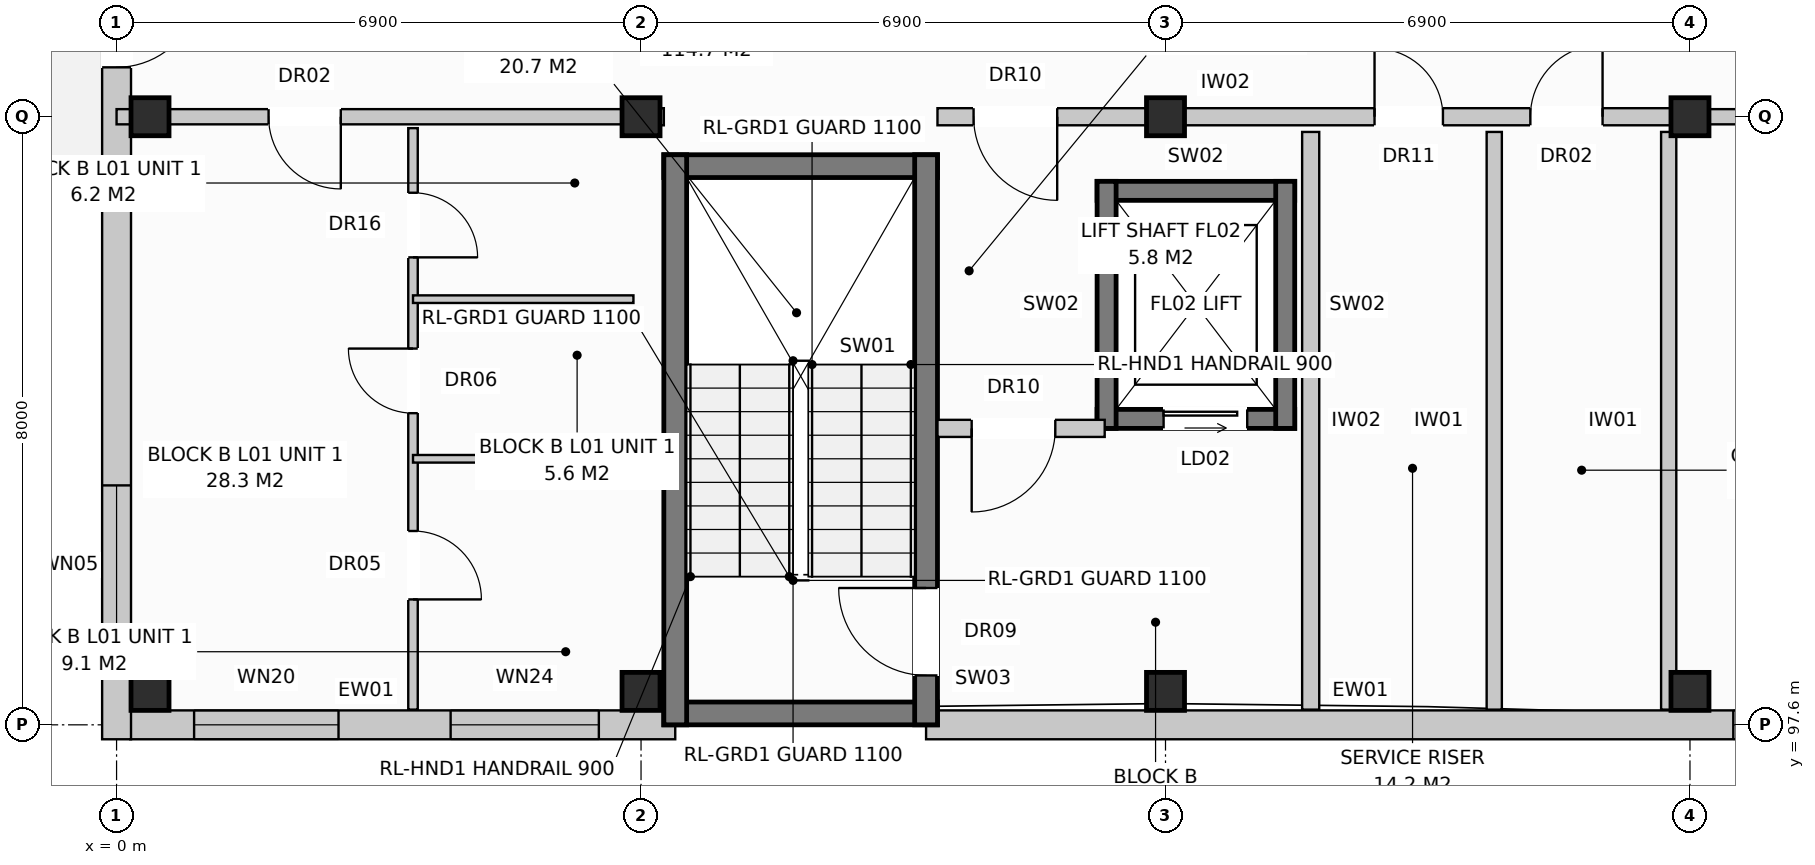
"""IFC4 building model, lengths in metres.
Left out: names, types, materials, properties, quantities, classifications, styles, units other than length and angle.
Written with IfcOpenShell. Run it as: python <this file> out.ifc"""

import sys

from ifc_helpers import new_model, si_unit, direction, frame, frame_2d, origin, origin_with_axes, origin_2d, place, context, subcontext, project, spatial, rectangle, extrude, element, fill, save


model = new_model("IFC4")
c1 = context("Model", 3, precision=1e-05, world=origin(), true_north=direction((0.0, 1.0)))
c2 = subcontext(c1, "Body", "Model", "MODEL_VIEW")
j1 = project(units=[si_unit("LENGTHUNIT", "METRE"), si_unit("PLANEANGLEUNIT", "RADIAN")], contexts=[c1])
p1 = place(None, origin())
s1 = spatial("IfcSite", under=j1, at=p1, CompositionType="ELEMENT")
p2 = place(p1, origin())
s2 = spatial("IfcBuilding", under=s1, at=p2, CompositionType="ELEMENT")
p3 = place(p2, frame((0.0, 0.0, 4.4)))
s3 = spatial("IfcBuildingStorey", under=s2, at=p3, CompositionType="ELEMENT", Elevation=4.4)
for number, where, z_axis, x_axis in (
    (1, (0.44, 98.04, 0.0), (0.0, 0.0, 1.0), (1.0, 0.0, 0.0)),
    (2, (0.44, 105.6, 0.0), (0.0, 0.0, 1.0), (1.0, 0.0, 0.0)),
    (3, (6.9, 98.04, 0.0), (0.0, 0.0, 1.0), (1.0, 0.0, 0.0)),
    (4, (6.9, 105.6, 0.0), (0.0, 0.0, 1.0), (1.0, 0.0, 0.0)),
    (5, (13.8, 98.04, 0.0), (0.0, 0.0, 1.0), (1.0, 0.0, 0.0)),
    (6, (13.8, 105.6, 0.0), (0.0, 0.0, 1.0), (1.0, 0.0, 0.0)),
    (7, (20.7, 98.04, 0.0), (0.0, 0.0, 1.0), (1.0, 0.0, 0.0)),
    (8, (20.7, 105.6, 0.0), (0.0, 0.0, 1.0), (1.0, 0.0, 0.0)),
):
    element("IfcColumn", number, at=place(p3, frame(where, z_axis=z_axis, x_axis=x_axis)), inside=s3, PredefinedType="COLUMN", context=c2, shape_type="SweptSolid", body=[
        extrude(rectangle(XDim=0.5, YDim=0.5, at=origin_2d()), origin(), (0.0, 0.0, 1.0), 3.6),
    ])
p4 = place(p3, frame((0.18, 97.6, 0.0), z_axis=(0.0, 0.0, 1.0), x_axis=(1.0, 0.0, 0.0)))
e9 = element("IfcWall", 9, at=p4, inside=s3, PredefinedType="STANDARD", context=c2, shape_type="SweptSolid", body=[
    extrude(rectangle(XDim=7.17, YDim=0.38, at=frame_2d((3.585, 0.0))), origin(), (0.0, 0.0, 1.0), 3.33),
])
p5 = place(p4, frame((0.84, 0.0, 0.8)))
e10 = element("IfcOpeningElement", 10, at=p5, cuts=e9, PredefinedType="OPENING", context=c2, shape_type="SweptSolid", body=[
    extrude(rectangle(XDim=1.9, YDim=1.85, at=frame_2d((0.95, 0.925))), frame((0.0, 0.202, 0.0), z_axis=(0.0, -1.0, 0.0), x_axis=(1.0, 0.0, 0.0)), (0.0, 0.0, 1.0), 0.404),
])
p6 = place(p4, frame((4.215, 0.0, 0.8)))
e11 = element("IfcOpeningElement", 11, at=p6, cuts=e9, PredefinedType="OPENING", context=c2, shape_type="SweptSolid", body=[
    extrude(rectangle(XDim=1.95, YDim=1.65, at=frame_2d((0.975, 0.825))), frame((0.0, 0.202, 0.0), z_axis=(0.0, -1.0, 0.0), x_axis=(1.0, 0.0, 0.0)), (0.0, 0.0, 1.0), 0.404),
])
p7 = place(p3, frame((10.65, 97.6, 0.0), z_axis=(0.0, 0.0, 1.0), x_axis=(1.0, 0.0, 0.0)))
e12 = element("IfcWall", 12, at=p7, inside=s3, PredefinedType="STANDARD", context=c2, shape_type="SweptSolid", body=[
    extrude(rectangle(XDim=17.4, YDim=0.38, at=frame_2d((8.7, 0.0))), origin(), (0.0, 0.0, 1.0), 3.33),
])
p8 = place(p7, frame((11.825, 0.0, 0.0)))
e13 = element("IfcOpeningElement", 13, at=p8, cuts=e12, PredefinedType="OPENING", context=c2, shape_type="SweptSolid", body=[
    extrude(rectangle(XDim=1.05, YDim=2.12, at=frame_2d((0.525, 1.06))), frame((0.0, 0.202, 0.0), z_axis=(0.0, -1.0, 0.0), x_axis=(1.0, 0.0, 0.0)), (0.0, 0.0, 1.0), 0.404),
])
p9 = place(p7, frame((10.62, 0.0, 0.9)))
e14 = element("IfcOpeningElement", 14, at=p9, cuts=e12, PredefinedType="OPENING", context=c2, shape_type="SweptSolid", body=[
    extrude(rectangle(XDim=0.95, YDim=1.55, at=frame_2d((0.475, 0.775))), frame((0.0, 0.202, 0.0), z_axis=(0.0, -1.0, 0.0), x_axis=(1.0, 0.0, 0.0)), (0.0, 0.0, 1.0), 0.404),
])
p10 = place(p7, frame((14.47, 0.0, 0.8)))
e15 = element("IfcOpeningElement", 15, at=p10, cuts=e12, PredefinedType="OPENING", context=c2, shape_type="SweptSolid", body=[
    extrude(rectangle(XDim=1.9, YDim=1.85, at=frame_2d((0.95, 0.925))), frame((0.0, 0.202, 0.0), z_axis=(0.0, -1.0, 0.0), x_axis=(1.0, 0.0, 0.0)), (0.0, 0.0, 1.0), 0.404),
])
p11 = place(p3, frame((0.0, 97.41, 0.0), z_axis=(0.0, 0.0, 1.0), x_axis=(0.0, 1.0, 0.0)))
e16 = element("IfcWall", 16, at=p11, inside=s3, PredefinedType="STANDARD", context=c2, shape_type="SweptSolid", body=[
    extrude(rectangle(XDim=18.78, YDim=0.38, at=frame_2d((9.39, 0.0))), origin(), (0.0, 0.0, 1.0), 3.33),
])
p12 = place(p11, frame((8.84, 0.0, 0.0)))
e17 = element("IfcOpeningElement", 17, at=p12, cuts=e16, PredefinedType="OPENING", context=c2, shape_type="SweptSolid", body=[
    extrude(rectangle(XDim=1.1, YDim=2.1, at=frame_2d((0.55, 1.05))), frame((0.0, 0.202, 0.0), z_axis=(0.0, -1.0, 0.0), x_axis=(1.0, 0.0, 0.0)), (0.0, 0.0, 1.0), 0.404),
])
p13 = place(p11, frame((1.24, 0.0, 0.72)))
e18 = element("IfcOpeningElement", 18, at=p13, cuts=e16, PredefinedType="OPENING", context=c2, shape_type="SweptSolid", body=[
    extrude(rectangle(XDim=2.1, YDim=1.9, at=frame_2d((1.05, 0.95))), frame((0.0, 0.202, 0.0), z_axis=(0.0, -1.0, 0.0), x_axis=(1.0, 0.0, 0.0)), (0.0, 0.0, 1.0), 0.404),
])
p14 = place(p11, frame((15.44, 0.0, 0.72)))
e19 = element("IfcOpeningElement", 19, at=p14, cuts=e16, PredefinedType="OPENING", context=c2, shape_type="SweptSolid", body=[
    extrude(rectangle(XDim=2.1, YDim=1.9, at=frame_2d((1.05, 0.95))), frame((0.0, 0.202, 0.0), z_axis=(0.0, -1.0, 0.0), x_axis=(1.0, 0.0, 0.0)), (0.0, 0.0, 1.0), 0.404),
])
for number, where, z_axis, x_axis in (
    (20, (7.2, 97.75, 0.0), (0.0, 0.0, 1.0), (1.0, 0.0, 0.0)),
    (21, (7.2, 104.95, 0.0), (0.0, 0.0, 1.0), (1.0, 0.0, 0.0)),
):
    element("IfcWall", number, at=place(p3, frame(where, z_axis=z_axis, x_axis=x_axis)), inside=s3, PredefinedType="SHEAR", context=c2, shape_type="SweptSolid", body=[
        extrude(rectangle(XDim=3.6, YDim=0.3, at=frame_2d((1.8, 0.0))), origin(), (0.0, 0.0, 1.0), 3.33),
    ])
p15 = place(p3, frame((7.35, 97.6, 0.0), z_axis=(0.0, 0.0, 1.0), x_axis=(0.0, 1.0, 0.0)))
e22 = element("IfcWall", 22, at=p15, inside=s3, PredefinedType="SHEAR", context=c2, shape_type="SweptSolid", body=[
    extrude(rectangle(XDim=7.5, YDim=0.3, at=frame_2d((3.75, 0.0))), origin(), (0.0, 0.0, 1.0), 3.33),
])
p16 = place(p3, frame((10.65, 97.6, 0.0), z_axis=(0.0, 0.0, 1.0), x_axis=(0.0, 1.0, 0.0)))
e23 = element("IfcWall", 23, at=p16, inside=s3, PredefinedType="SHEAR", context=c2, shape_type="SweptSolid", body=[
    extrude(rectangle(XDim=7.5, YDim=0.3, at=frame_2d((3.75, 0.0))), origin(), (0.0, 0.0, 1.0), 3.33),
])
p17 = place(p16, frame((0.65, 0.0, 0.0)))
e24 = element("IfcOpeningElement", 24, at=p17, cuts=e23, PredefinedType="OPENING", context=c2, shape_type="SweptSolid", body=[
    extrude(rectangle(XDim=1.15, YDim=2.15, at=frame_2d((0.575, 1.075))), frame((0.0, 0.162, 0.0), z_axis=(0.0, -1.0, 0.0), x_axis=(1.0, 0.0, 0.0)), (0.0, 0.0, 1.0), 0.324),
])
p18 = place(p3, frame((12.9, 101.625, 0.0), z_axis=(0.0, 0.0, 1.0), x_axis=(1.0, 0.0, 0.0)))
e25 = element("IfcWall", 25, at=p18, inside=s3, PredefinedType="SHEAR", context=c2, shape_type="SweptSolid", body=[
    extrude(rectangle(XDim=2.6, YDim=0.25, at=frame_2d((1.3, 0.0))), origin(), (0.0, 0.0, 1.0), 3.33),
])
p19 = place(p18, frame((0.875, 0.0, 0.0)))
e26 = element("IfcOpeningElement", 26, at=p19, cuts=e25, PredefinedType="OPENING", context=c2, shape_type="SweptSolid", body=[
    extrude(rectangle(XDim=1.1, YDim=2.1, at=frame_2d((0.55, 1.05))), frame((0.0, 0.137, 0.0), z_axis=(0.0, -1.0, 0.0), x_axis=(1.0, 0.0, 0.0)), (0.0, 0.0, 1.0), 0.274),
])
p20 = place(p3, frame((12.9, 104.625, 0.0), z_axis=(0.0, 0.0, 1.0), x_axis=(1.0, 0.0, 0.0)))
e27 = element("IfcWall", 27, at=p20, inside=s3, PredefinedType="SHEAR", context=c2, shape_type="SweptSolid", body=[
    extrude(rectangle(XDim=2.6, YDim=0.25, at=frame_2d((1.3, 0.0))), origin(), (0.0, 0.0, 1.0), 3.33),
])
for number, where, z_axis, x_axis in (
    (28, (13.025, 101.5, 0.0), (0.0, 0.0, 1.0), (0.0, 1.0, 0.0)),
    (29, (15.375, 101.5, 0.0), (0.0, 0.0, 1.0), (0.0, 1.0, 0.0)),
):
    element("IfcWall", number, at=place(p3, frame(where, z_axis=z_axis, x_axis=x_axis)), inside=s3, PredefinedType="SHEAR", context=c2, shape_type="SweptSolid", body=[
        extrude(rectangle(XDim=3.25, YDim=0.25, at=frame_2d((1.625, 0.0))), origin(), (0.0, 0.0, 1.0), 3.33),
    ])
p21 = place(p3, frame((15.71, 97.8, 0.0), z_axis=(0.0, 0.0, 1.0), x_axis=(0.0, 1.0, 0.0)))
e30 = element("IfcWall", 30, at=p21, inside=s3, PredefinedType="PARTITIONING", context=c2, shape_type="SweptSolid", body=[
    extrude(rectangle(XDim=7.6, YDim=0.225, at=frame_2d((3.8, 0.0))), origin(), (0.0, 0.0, 1.0), 2.99),
])
p22 = place(p3, frame((10.8, 101.5, 0.0), z_axis=(0.0, 0.0, 1.0), x_axis=(1.0, 0.0, 0.0)))
e31 = element("IfcWall", 31, at=p22, inside=s3, PredefinedType="PARTITIONING", context=c2, shape_type="SweptSolid", body=[
    extrude(rectangle(XDim=2.2, YDim=0.225, at=frame_2d((1.1, 0.0))), origin(), (0.0, 0.0, 1.0), 3.33),
])
p23 = place(p22, frame((0.45, 0.0, 0.0)))
e32 = element("IfcOpeningElement", 32, at=p23, cuts=e31, PredefinedType="OPENING", context=c2, shape_type="SweptSolid", body=[
    extrude(rectangle(XDim=1.1, YDim=2.15, at=frame_2d((0.55, 1.075))), frame((0.0, 0.125, 0.0), z_axis=(0.0, -1.0, 0.0), x_axis=(1.0, 0.0, 0.0)), (0.0, 0.0, 1.0), 0.249),
])
p24 = place(p3, frame((6.9, 105.6, 0.0), z_axis=(0.0, 0.0, 1.0), x_axis=(1.0, 0.0, 0.0)))
e33 = element("IfcWall", 33, at=p24, inside=s3, PredefinedType="PARTITIONING", context=c2, shape_type="SweptSolid", body=[
    extrude(rectangle(XDim=0.3, YDim=0.225, at=frame_2d((0.15, 0.0))), origin(), (0.0, 0.0, 1.0), 3.33),
])
for number, where, z_axis, x_axis in (
    (34, (18.125, 97.8, 0.0), (0.0, 0.0, 1.0), (0.0, 1.0, 0.0)),
    (35, (20.42, 97.8, 0.0), (0.0, 0.0, 1.0), (0.0, 1.0, 0.0)),
):
    element("IfcWall", number, at=place(p3, frame(where, z_axis=z_axis, x_axis=x_axis)), inside=s3, PredefinedType="PARTITIONING", context=c2, shape_type="SweptSolid", body=[
        extrude(rectangle(XDim=7.6, YDim=0.2, at=frame_2d((3.8, 0.0))), origin(), (0.0, 0.0, 1.0), 3.33),
    ])
p25 = place(p3, frame((10.8, 105.6, 0.0), z_axis=(0.0, 0.0, 1.0), x_axis=(1.0, 0.0, 0.0)))
e36 = element("IfcWall", 36, at=p25, inside=s3, PredefinedType="PARTITIONING", context=c2, shape_type="SweptSolid", body=[
    extrude(rectangle(XDim=9.9, YDim=0.225, at=frame_2d((4.95, 0.0))), origin(), (0.0, 0.0, 1.0), 2.77),
])
p26 = place(p25, frame((0.475, 0.0, 0.0)))
e37 = element("IfcOpeningElement", 37, at=p26, cuts=e36, PredefinedType="OPENING", context=c2, shape_type="SweptSolid", body=[
    extrude(rectangle(XDim=1.1, YDim=2.15, at=frame_2d((0.55, 1.075))), frame((0.0, 0.125, 0.0), z_axis=(0.0, -1.0, 0.0), x_axis=(1.0, 0.0, 0.0)), (0.0, 0.0, 1.0), 0.249),
])
p27 = place(p25, frame((5.75, 0.0, 0.0)))
e38 = element("IfcOpeningElement", 38, at=p27, cuts=e36, PredefinedType="OPENING", context=c2, shape_type="SweptSolid", body=[
    extrude(rectangle(XDim=0.9, YDim=2.1, at=frame_2d((0.45, 1.05))), frame((0.0, 0.125, 0.0), z_axis=(0.0, -1.0, 0.0), x_axis=(1.0, 0.0, 0.0)), (0.0, 0.0, 1.0), 0.249),
])
p28 = place(p25, frame((7.8, 0.0, 0.0)))
e39 = element("IfcOpeningElement", 39, at=p28, cuts=e36, PredefinedType="OPENING", context=c2, shape_type="SweptSolid", body=[
    extrude(rectangle(XDim=0.95, YDim=2.15, at=frame_2d((0.475, 1.075))), frame((0.0, 0.125, 0.0), z_axis=(0.0, -1.0, 0.0), x_axis=(1.0, 0.0, 0.0)), (0.0, 0.0, 1.0), 0.249),
])
p29 = place(p3, frame((0.0, 105.6, 0.0), z_axis=(0.0, 0.0, 1.0), x_axis=(1.0, 0.0, 0.0)))
e40 = element("IfcWall", 40, at=p29, inside=s3, PredefinedType="PARTITIONING", context=c2, shape_type="SweptSolid", body=[
    extrude(rectangle(XDim=6.9, YDim=0.2, at=frame_2d((3.45, 0.0))), origin(), (0.0, 0.0, 1.0), 2.77),
])
p30 = place(p29, frame((2.0, 0.0, 0.0)))
e41 = element("IfcOpeningElement", 41, at=p30, cuts=e40, PredefinedType="OPENING", context=c2, shape_type="SweptSolid", body=[
    extrude(rectangle(XDim=0.95, YDim=2.15, at=frame_2d((0.475, 1.075))), frame((0.0, 0.112, 0.0), z_axis=(0.0, -1.0, 0.0), x_axis=(1.0, 0.0, 0.0)), (0.0, 0.0, 1.0), 0.224),
])
p31 = place(p3, frame((3.9, 105.45, 0.0), z_axis=(0.0, 0.0, 1.0), x_axis=(0.0, -1.0, 0.0)))
e42 = element("IfcWall", 42, at=p31, inside=s3, PredefinedType="PARTITIONING", context=c2, shape_type="SweptSolid", body=[
    extrude(rectangle(XDim=7.65, YDim=0.125, at=frame_2d((3.825, 0.0))), origin(), (0.0, 0.0, 1.0), 3.33),
])
p32 = place(p31, frame((0.85, 0.0, 0.0)))
e43 = element("IfcOpeningElement", 43, at=p32, cuts=e42, PredefinedType="OPENING", context=c2, shape_type="SweptSolid", body=[
    extrude(rectangle(XDim=0.85, YDim=2.1, at=frame_2d((0.425, 1.05))), frame((0.0, 0.074, 0.0), z_axis=(0.0, -1.0, 0.0), x_axis=(1.0, 0.0, 0.0)), (0.0, 0.0, 1.0), 0.149),
])
p33 = place(p31, frame((2.9, 0.0, 0.0)))
e44 = element("IfcOpeningElement", 44, at=p33, cuts=e42, PredefinedType="OPENING", context=c2, shape_type="SweptSolid", body=[
    extrude(rectangle(XDim=0.85, YDim=2.05, at=frame_2d((0.425, 1.025))), frame((0.0, 0.074, 0.0), z_axis=(0.0, -1.0, 0.0), x_axis=(1.0, 0.0, 0.0)), (0.0, 0.0, 1.0), 0.149),
])
p34 = place(p31, frame((5.3, 0.0, 0.0)))
e45 = element("IfcOpeningElement", 45, at=p34, cuts=e42, PredefinedType="OPENING", context=c2, shape_type="SweptSolid", body=[
    extrude(rectangle(XDim=0.9, YDim=2.1, at=frame_2d((0.45, 1.05))), frame((0.0, 0.074, 0.0), z_axis=(0.0, -1.0, 0.0), x_axis=(1.0, 0.0, 0.0)), (0.0, 0.0, 1.0), 0.149),
])
for number, where, z_axis, x_axis in (
    (46, (3.9, 103.2, 0.0), (0.0, 0.0, 1.0), (1.0, 0.0, 0.0)),
    (47, (3.9, 101.1, 0.0), (0.0, 0.0, 1.0), (1.0, 0.0, 0.0)),
):
    element("IfcWall", number, at=place(p3, frame(where, z_axis=z_axis, x_axis=x_axis)), inside=s3, PredefinedType="PARTITIONING", context=c2, shape_type="SweptSolid", body=[
        extrude(rectangle(XDim=2.9, YDim=0.1, at=frame_2d((1.45, 0.0))), origin(), (0.0, 0.0, 1.0), 3.33),
    ])
p35 = place(p3, frame((20.7, 105.6, 0.0), z_axis=(0.0, 0.0, 1.0), x_axis=(1.0, 0.0, 0.0)))
e48 = element("IfcWall", 48, at=p35, inside=s3, PredefinedType="PARTITIONING", context=c2, shape_type="SweptSolid", body=[
    extrude(rectangle(XDim=6.9, YDim=0.2, at=frame_2d((3.45, 0.0))), origin(), (0.0, 0.0, 1.0), 2.77),
])
p36 = place(p35, frame((2.0, 0.0, 0.0)))
e49 = element("IfcOpeningElement", 49, at=p36, cuts=e48, PredefinedType="OPENING", context=c2, shape_type="SweptSolid", body=[
    extrude(rectangle(XDim=0.95, YDim=2.15, at=frame_2d((0.475, 1.075))), frame((0.0, 0.112, 0.0), z_axis=(0.0, -1.0, 0.0), x_axis=(1.0, 0.0, 0.0)), (0.0, 0.0, 1.0), 0.224),
])
p37 = place(p5, origin_with_axes())
e50 = element("IfcWindow", 50, at=p37, inside=s3, PartitioningType="SINGLE_PANEL", PredefinedType="WINDOW", context=c2, shape_type="SweptSolid", body=[
    extrude(rectangle(XDim=1.9, YDim=1.85, at=frame_2d((0.95, 0.925))), frame((0.0, 0.03, 0.0), z_axis=(0.0, -1.0, 0.0), x_axis=(1.0, 0.0, 0.0)), (0.0, 0.0, 1.0), 0.06),
])
fill(e10, e50)
p38 = place(p6, origin_with_axes())
e51 = element("IfcWindow", 51, at=p38, inside=s3, PartitioningType="SINGLE_PANEL", PredefinedType="WINDOW", context=c2, shape_type="SweptSolid", body=[
    extrude(rectangle(XDim=1.95, YDim=1.65, at=frame_2d((0.975, 0.825))), frame((0.0, 0.03, 0.0), z_axis=(0.0, -1.0, 0.0), x_axis=(1.0, 0.0, 0.0)), (0.0, 0.0, 1.0), 0.06),
])
fill(e11, e51)
p39 = place(p9, origin_with_axes())
e52 = element("IfcWindow", 52, at=p39, inside=s3, PartitioningType="SINGLE_PANEL", PredefinedType="WINDOW", context=c2, shape_type="SweptSolid", body=[
    extrude(rectangle(XDim=0.95, YDim=1.55, at=frame_2d((0.475, 0.775))), frame((0.0, 0.03, 0.0), z_axis=(0.0, -1.0, 0.0), x_axis=(1.0, 0.0, 0.0)), (0.0, 0.0, 1.0), 0.06),
])
fill(e14, e52)
p40 = place(p12, frame((1.1, 0.0, 0.0), z_axis=(0.0, 0.0, 1.0), x_axis=(-1.0, 0.0, 0.0)))
e53 = element("IfcDoor", 53, at=p40, inside=s3, OperationType="SINGLE_SWING_RIGHT", PredefinedType="DOOR", context=c2, shape_type="SweptSolid", body=[
    extrude(rectangle(XDim=1.1, YDim=2.1, at=frame_2d((0.55, 1.05))), frame((0.0, 0.025, 0.0), z_axis=(0.0, -1.0, 0.0), x_axis=(1.0, 0.0, 0.0)), (0.0, 0.0, 1.0), 0.05),
])
fill(e17, e53)
p41 = place(p13, origin_with_axes())
e54 = element("IfcWindow", 54, at=p41, inside=s3, PartitioningType="SINGLE_PANEL", PredefinedType="WINDOW", context=c2, shape_type="SweptSolid", body=[
    extrude(rectangle(XDim=2.1, YDim=1.9, at=frame_2d((1.05, 0.95))), frame((0.0, 0.03, 0.0), z_axis=(0.0, -1.0, 0.0), x_axis=(1.0, 0.0, 0.0)), (0.0, 0.0, 1.0), 0.06),
])
fill(e18, e54)
p42 = place(p17, origin_with_axes())
e55 = element("IfcDoor", 55, at=p42, inside=s3, OperationType="SINGLE_SWING_RIGHT", PredefinedType="DOOR", context=c2, shape_type="SweptSolid", body=[
    extrude(rectangle(XDim=1.15, YDim=2.15, at=frame_2d((0.575, 1.075))), frame((0.0, 0.025, 0.0), z_axis=(0.0, -1.0, 0.0), x_axis=(1.0, 0.0, 0.0)), (0.0, 0.0, 1.0), 0.05),
])
fill(e24, e55)
p43 = place(p19, origin_with_axes())
e56 = element("IfcDoor", 56, at=p43, inside=s3, OperationType="SLIDING_TO_LEFT", PredefinedType="DOOR", context=c2, shape_type="SweptSolid", body=[
    extrude(rectangle(XDim=1.1, YDim=2.1, at=frame_2d((0.55, 1.05))), frame((0.0, 0.025, 0.0), z_axis=(0.0, -1.0, 0.0), x_axis=(1.0, 0.0, 0.0)), (0.0, 0.0, 1.0), 0.05),
])
fill(e26, e56)
p44 = place(p23, frame((1.1, 0.0, 0.0), z_axis=(0.0, 0.0, 1.0), x_axis=(-1.0, 0.0, 0.0)))
e57 = element("IfcDoor", 57, at=p44, inside=s3, OperationType="SINGLE_SWING_LEFT", PredefinedType="DOOR", context=c2, shape_type="SweptSolid", body=[
    extrude(rectangle(XDim=1.1, YDim=2.15, at=frame_2d((0.55, 1.075))), frame((0.0, 0.025, 0.0), z_axis=(0.0, -1.0, 0.0), x_axis=(1.0, 0.0, 0.0)), (0.0, 0.0, 1.0), 0.05),
])
fill(e32, e57)
p45 = place(p26, frame((1.1, 0.0, 0.0), z_axis=(0.0, 0.0, 1.0), x_axis=(-1.0, 0.0, 0.0)))
e58 = element("IfcDoor", 58, at=p45, inside=s3, OperationType="SINGLE_SWING_RIGHT", PredefinedType="DOOR", context=c2, shape_type="SweptSolid", body=[
    extrude(rectangle(XDim=1.1, YDim=2.15, at=frame_2d((0.55, 1.075))), frame((0.0, 0.025, 0.0), z_axis=(0.0, -1.0, 0.0), x_axis=(1.0, 0.0, 0.0)), (0.0, 0.0, 1.0), 0.05),
])
fill(e37, e58)
p46 = place(p27, origin_with_axes())
e59 = element("IfcDoor", 59, at=p46, inside=s3, OperationType="SINGLE_SWING_LEFT", PredefinedType="DOOR", context=c2, shape_type="SweptSolid", body=[
    extrude(rectangle(XDim=0.9, YDim=2.1, at=frame_2d((0.45, 1.05))), frame((0.0, 0.025, 0.0), z_axis=(0.0, -1.0, 0.0), x_axis=(1.0, 0.0, 0.0)), (0.0, 0.0, 1.0), 0.05),
])
fill(e38, e59)
p47 = place(p28, origin_with_axes())
e60 = element("IfcDoor", 60, at=p47, inside=s3, OperationType="SINGLE_SWING_RIGHT", PredefinedType="DOOR", context=c2, shape_type="SweptSolid", body=[
    extrude(rectangle(XDim=0.95, YDim=2.15, at=frame_2d((0.475, 1.075))), frame((0.0, 0.025, 0.0), z_axis=(0.0, -1.0, 0.0), x_axis=(1.0, 0.0, 0.0)), (0.0, 0.0, 1.0), 0.05),
])
fill(e39, e60)
p48 = place(p30, frame((0.95, 0.0, 0.0), z_axis=(0.0, 0.0, 1.0), x_axis=(-1.0, 0.0, 0.0)))
e61 = element("IfcDoor", 61, at=p48, inside=s3, OperationType="SINGLE_SWING_RIGHT", PredefinedType="DOOR", context=c2, shape_type="SweptSolid", body=[
    extrude(rectangle(XDim=0.95, YDim=2.15, at=frame_2d((0.475, 1.075))), frame((0.0, 0.025, 0.0), z_axis=(0.0, -1.0, 0.0), x_axis=(1.0, 0.0, 0.0)), (0.0, 0.0, 1.0), 0.05),
])
fill(e41, e61)
p49 = place(p32, origin_with_axes())
e62 = element("IfcDoor", 62, at=p49, inside=s3, OperationType="SINGLE_SWING_RIGHT", PredefinedType="DOOR", context=c2, shape_type="SweptSolid", body=[
    extrude(rectangle(XDim=0.85, YDim=2.1, at=frame_2d((0.425, 1.05))), frame((0.0, 0.025, 0.0), z_axis=(0.0, -1.0, 0.0), x_axis=(1.0, 0.0, 0.0)), (0.0, 0.0, 1.0), 0.05),
])
fill(e43, e62)
p50 = place(p33, frame((0.85, 0.0, 0.0), z_axis=(0.0, 0.0, 1.0), x_axis=(-1.0, 0.0, 0.0)))
e63 = element("IfcDoor", 63, at=p50, inside=s3, OperationType="SINGLE_SWING_LEFT", PredefinedType="DOOR", context=c2, shape_type="SweptSolid", body=[
    extrude(rectangle(XDim=0.85, YDim=2.05, at=frame_2d((0.425, 1.025))), frame((0.0, 0.025, 0.0), z_axis=(0.0, -1.0, 0.0), x_axis=(1.0, 0.0, 0.0)), (0.0, 0.0, 1.0), 0.05),
])
fill(e44, e63)
p51 = place(p34, origin_with_axes())
e64 = element("IfcDoor", 64, at=p51, inside=s3, OperationType="SINGLE_SWING_RIGHT", PredefinedType="DOOR", context=c2, shape_type="SweptSolid", body=[
    extrude(rectangle(XDim=0.9, YDim=2.1, at=frame_2d((0.45, 1.05))), frame((0.0, 0.025, 0.0), z_axis=(0.0, -1.0, 0.0), x_axis=(1.0, 0.0, 0.0)), (0.0, 0.0, 1.0), 0.05),
])
fill(e45, e64)
save(model, sys.argv[1])
